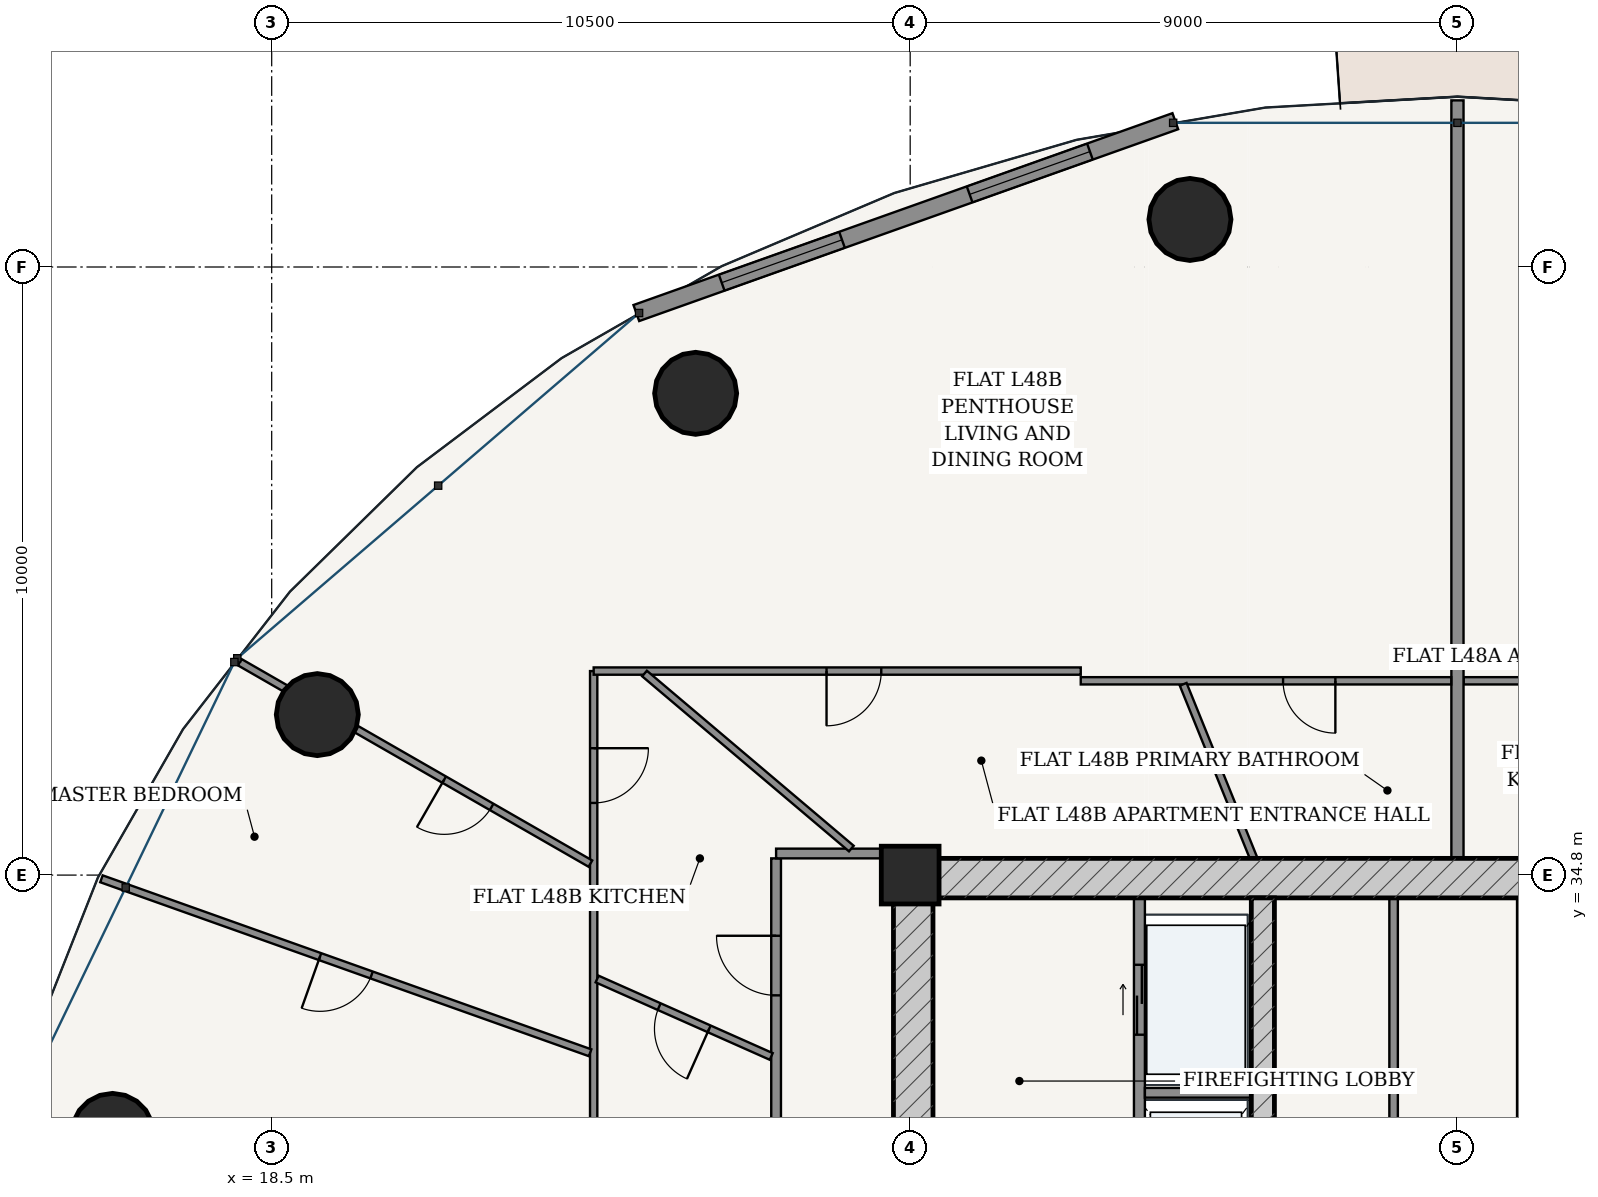
"""IFC4 building model, lengths in metres.
Left out: names, types, materials, properties, quantities, classifications, styles, units other than length and angle.
Written with IfcOpenShell. Run it as: python <this file> out.ifc"""

import sys

from ifc_helpers import new_model, si_unit, direction, frame, frame_2d, origin, origin_2d, place, context, subcontext, project, spatial, rectangle, hollow_circle, extrude, source, transform, mapped, element, fill, save


model = new_model("IFC4")
c1 = context("Model", 3, precision=1e-05, world=origin(), true_north=direction((-0.2419218956, 0.970295726276)))
c2 = subcontext(c1, "Body", "Model", "MODEL_VIEW")
j1 = project(units=[si_unit("LENGTHUNIT", "METRE"), si_unit("PLANEANGLEUNIT", "RADIAN")], contexts=[c1])
p1 = place(None, origin())
s1 = spatial("IfcSite", under=j1, at=p1, CompositionType="ELEMENT")
p2 = place(p1, origin())
s2 = spatial("IfcBuilding", under=s1, at=p2, CompositionType="ELEMENT")
p3 = place(p2, frame((0.0, 0.0, 182.2)))
s3 = spatial("IfcBuildingStorey", under=s2, at=p3, CompositionType="ELEMENT", Elevation=182.2)
p4 = place(p3, frame((29.0, 34.8, 0.0), z_axis=(0.0, 0.0, 1.0), x_axis=(1.0, 0.0, 0.0)))
e1 = element("IfcColumn", 1, at=p4, inside=s3, PredefinedType="COLUMN", context=c2, shape_type="SweptSolid", body=[
    extrude(rectangle(XDim=0.95, YDim=0.95, at=origin_2d()), origin(), (0.0, 0.0, 1.0), 3.6),
])
p5 = place(p3, frame((28.725, 34.75, 0.0), z_axis=(0.0, 0.0, 1.0), x_axis=(1.0, 0.0, 0.0)))
e2 = element("IfcWall", 2, at=p5, inside=s3, PredefinedType="SHEAR", context=c2, shape_type="SweptSolid", body=[
    extrude(rectangle(XDim=18.55, YDim=0.65, at=frame_2d((9.275, 0.0))), origin(), (0.0, 0.0, 1.0), 3.15),
])
p6 = place(p3, frame((29.05, 19.175, 0.0), z_axis=(0.0, 0.0, 1.0), x_axis=(0.0, 1.0, 0.0)))
e3 = element("IfcWall", 3, at=p6, inside=s3, PredefinedType="SHEAR", context=c2, shape_type="SweptSolid", body=[
    extrude(rectangle(XDim=15.25, YDim=0.65, at=frame_2d((7.625, 0.0))), origin(), (0.0, 0.0, 1.0), 3.15),
])
p7 = place(p6, frame((9.875, 0.0, 0.0)))
e4 = element("IfcOpeningElement", 4, at=p7, cuts=e3, PredefinedType="OPENING", context=c2, shape_type="SweptSolid", body=[
    extrude(rectangle(XDim=1.5, YDim=2.2, at=frame_2d((0.75, 1.1))), frame((0.0, 0.335, 0.0), z_axis=(0.0, -1.0, 0.0), x_axis=(1.0, 0.0, 0.0)), (0.0, 0.0, 1.0), 0.67),
])
p8 = place(p3, frame((34.8, 19.175, 0.0), z_axis=(0.0, 0.0, 1.0), x_axis=(0.0, 1.0, 0.0)))
e5 = element("IfcWall", 5, at=p8, inside=s3, PredefinedType="SHEAR", context=c2, shape_type="SweptSolid", body=[
    extrude(rectangle(XDim=15.25, YDim=0.38, at=frame_2d((7.625, 0.0))), origin(), (0.0, 0.0, 1.0), 3.15),
])
p9 = place(p8, frame((7.8, 0.0, 0.0)))
e6 = element("IfcOpeningElement", 6, at=p9, cuts=e5, PredefinedType="OPENING", context=c2, shape_type="SweptSolid", body=[
    extrude(rectangle(XDim=1.05, YDim=2.15, at=frame_2d((0.525, 1.075))), frame((0.0, 0.2, 0.0), z_axis=(0.0, -1.0, 0.0), x_axis=(1.0, 0.0, 0.0)), (0.0, 0.0, 1.0), 0.4),
])
for number, where, z_axis, x_axis in (
    (7, (33.601, 45.582, 0.0), (0.0, 0.0, 1.0), (1.0, 0.0, 0.0)),
    (8, (25.472, 42.723, 0.0), (0.0, 0.0, 1.0), (1.0, 0.0, 0.0)),
    (9, (19.25, 37.439, 0.0), (0.0, 0.0, 1.0), (1.0, 0.0, 0.0)),
    (10, (15.883, 30.536, 0.0), (0.0, 0.0, 1.0), (1.0, 0.0, 0.0)),
):
    element("IfcColumn", number, at=place(p3, frame(where, z_axis=z_axis, x_axis=x_axis)), inside=s3, PredefinedType="COLUMN", context=c2, shape_type="SweptSolid", body=[
        extrude(hollow_circle(Radius=0.675, WallThickness=0.042, at=origin_2d()), origin(), (0.0, 0.0, 1.0), 3.6),
    ])
p10 = place(p3, frame((33.36, 47.198, 0.0), z_axis=(0.0, 0.0, 1.0), x_axis=(-0.942095406405, -0.335344964522, 0.0)))
e11 = element("IfcWall", 11, at=p10, inside=s3, PredefinedType="SOLIDWALL", context=c2, shape_type="SweptSolid", body=[
    extrude(rectangle(XDim=9.408, YDim=0.28, at=frame_2d((4.704, 0.0))), origin(), (0.0, 0.0, 1.0), 3.15),
])
p11 = place(p10, frame((1.49, 0.0, 0.85)))
e12 = element("IfcOpeningElement", 12, at=p11, cuts=e11, PredefinedType="OPENING", context=c2, shape_type="SweptSolid", body=[
    extrude(rectangle(XDim=2.1, YDim=1.95, at=frame_2d((1.05, 0.975))), frame((0.0, 0.15, 0.0), z_axis=(0.0, -1.0, 0.0), x_axis=(1.0, 0.0, 0.0)), (0.0, 0.0, 1.0), 0.3),
])
p12 = place(p10, frame((5.818, 0.0, 0.85)))
e13 = element("IfcOpeningElement", 13, at=p12, cuts=e11, PredefinedType="OPENING", context=c2, shape_type="SweptSolid", body=[
    extrude(rectangle(XDim=2.1, YDim=1.95, at=frame_2d((1.05, 0.975))), frame((0.0, 0.15, 0.0), z_axis=(0.0, -1.0, 0.0), x_axis=(1.0, 0.0, 0.0)), (0.0, 0.0, 1.0), 0.3),
])
p13 = place(p3, frame((32.77, 28.52, 0.0), z_axis=(0.0, 0.0, 1.0), x_axis=(0.0, 1.0, 0.0)))
e14 = element("IfcWall", 14, at=p13, inside=s3, PredefinedType="PARTITIONING", context=c2, shape_type="SweptSolid", body=[
    extrude(rectangle(XDim=5.905, YDim=0.18, at=frame_2d((2.953, 0.0))), origin(), (0.0, 0.0, 1.0), 3.15),
])
p14 = place(p13, frame((3.655, 0.0, 0.0)))
e15 = element("IfcOpeningElement", 15, at=p14, cuts=e14, PredefinedType="OPENING", context=c2, shape_type="SweptSolid", body=[
    extrude(rectangle(XDim=1.15, YDim=2.2, at=frame_2d((0.575, 1.1))), frame((0.0, 0.1, 0.0), z_axis=(0.0, -1.0, 0.0), x_axis=(1.0, 0.0, 0.0)), (0.0, 0.0, 1.0), 0.2),
])
p15 = place(p13, frame((0.73, 0.0, 0.0)))
e16 = element("IfcOpeningElement", 16, at=p15, cuts=e14, PredefinedType="OPENING", context=c2, shape_type="SweptSolid", body=[
    extrude(rectangle(XDim=1.2, YDim=2.25, at=frame_2d((0.6, 1.125))), frame((0.0, 0.1, 0.0), z_axis=(0.0, -1.0, 0.0), x_axis=(1.0, 0.0, 0.0)), (0.0, 0.0, 1.0), 0.2),
])
p16 = place(p3, frame((32.86, 31.22, 0.0), z_axis=(0.0, 0.0, 1.0), x_axis=(1.0, 0.0, 0.0)))
e17 = element("IfcWall", 17, at=p16, inside=s3, PredefinedType="PARTITIONING", context=c2, shape_type="SweptSolid", body=[
    extrude(rectangle(XDim=1.75, YDim=0.16, at=frame_2d((0.875, 0.0))), origin(), (0.0, 0.0, 1.0), 3.15),
])
for number, where, z_axis, x_axis in (
    (18, (36.95, 28.56, 0.0), (0.0, 0.0, 1.0), (0.0, 1.0, 0.0)),
    (19, (39.05, 28.56, 0.0), (0.0, 0.0, 1.0), (0.0, 1.0, 0.0)),
):
    element("IfcWall", number, at=place(p3, frame(where, z_axis=z_axis, x_axis=x_axis)), inside=s3, PredefinedType="PARTITIONING", context=c2, shape_type="SweptSolid", body=[
        extrude(rectangle(XDim=5.865, YDim=0.14, at=frame_2d((2.933, 0.0))), origin(), (0.0, 0.0, 1.0), 3.15),
    ])
p17 = place(p3, frame((26.795, 24.4, 0.0), z_axis=(0.0, 0.0, 1.0), x_axis=(0.0, 1.0, 0.0)))
e20 = element("IfcWall", 20, at=p17, inside=s3, PredefinedType="PARTITIONING", context=c2, shape_type="SweptSolid", body=[
    extrude(rectangle(XDim=10.675, YDim=0.16, at=frame_2d((5.337, 0.0))), origin(), (0.0, 0.0, 1.0), 2.666),
])
p18 = place(p17, frame((8.422, 0.0, 0.0)))
e21 = element("IfcOpeningElement", 21, at=p18, cuts=e20, PredefinedType="OPENING", context=c2, shape_type="SweptSolid", body=[
    extrude(rectangle(XDim=0.98, YDim=2.2, at=frame_2d((0.49, 1.1))), frame((0.0, 0.09, 0.0), z_axis=(0.0, -1.0, 0.0), x_axis=(1.0, 0.0, 0.0)), (0.0, 0.0, 1.0), 0.18),
])
p19 = place(p3, frame((26.795, 35.155, 0.0), z_axis=(0.0, 0.0, 1.0), x_axis=(1.0, 0.0, 0.0)))
e22 = element("IfcWall", 22, at=p19, inside=s3, PredefinedType="PARTITIONING", context=c2, shape_type="SweptSolid", body=[
    extrude(rectangle(XDim=1.93, YDim=0.16, at=frame_2d((0.965, 0.0))), origin(), (0.0, 0.0, 1.0), 3.15),
])
p20 = place(p3, frame((38.102, 37.995, 0.0), z_axis=(0.0, 0.0, 1.0), x_axis=(1.0, 0.0, 0.0)))
e23 = element("IfcWall", 23, at=p20, inside=s3, PredefinedType="PARTITIONING", context=c2, shape_type="SweptSolid", body=[
    extrude(rectangle(XDim=6.093, YDim=0.12, at=frame_2d((3.046, 0.0))), origin(), (0.0, 0.0, 1.0), 2.666),
])
p21 = place(p3, frame((38.0, 35.075, 0.0), z_axis=(0.0, 0.0, 1.0), x_axis=(0.0, 1.0, 0.0)))
e24 = element("IfcWall", 24, at=p21, inside=s3, PredefinedType="PARTITIONING", context=c2, shape_type="SweptSolid", body=[
    extrude(rectangle(XDim=12.465, YDim=0.2, at=frame_2d((6.232, 0.0))), origin(), (0.0, 0.0, 1.0), 2.34),
])
p22 = place(p3, frame((23.795, 26.902, 0.0), z_axis=(0.0, 0.0, 1.0), x_axis=(0.0, 1.0, 0.0)))
e25 = element("IfcWall", 25, at=p22, inside=s3, PredefinedType="PARTITIONING", context=c2, shape_type="SweptSolid", body=[
    extrude(rectangle(XDim=11.253, YDim=0.12, at=frame_2d((5.626, 0.0))), origin(), (0.0, 0.0, 1.0), 2.666),
])
p23 = place(p22, frame((9.085, 0.0, 0.0)))
e26 = element("IfcOpeningElement", 26, at=p23, cuts=e25, PredefinedType="OPENING", context=c2, shape_type="SweptSolid", body=[
    extrude(rectangle(XDim=0.9, YDim=2.15, at=frame_2d((0.45, 1.075))), frame((0.0, 0.07, 0.0), z_axis=(0.0, -1.0, 0.0), x_axis=(1.0, 0.0, 0.0)), (0.0, 0.0, 1.0), 0.14),
])
p24 = place(p3, frame((23.795, 38.155, 0.0), z_axis=(0.0, 0.0, 1.0), x_axis=(1.0, 0.0, 0.0)))
e27 = element("IfcWall", 27, at=p24, inside=s3, PredefinedType="PARTITIONING", context=c2, shape_type="SweptSolid", body=[
    extrude(rectangle(XDim=8.01, YDim=0.12, at=frame_2d((4.005, 0.0))), origin(), (0.0, 0.0, 1.0), 2.666),
])
p25 = place(p24, frame((3.83, 0.0, 0.0)))
e28 = element("IfcOpeningElement", 28, at=p25, cuts=e27, PredefinedType="OPENING", context=c2, shape_type="SweptSolid", body=[
    extrude(rectangle(XDim=0.9, YDim=2.15, at=frame_2d((0.45, 1.075))), frame((0.0, 0.07, 0.0), z_axis=(0.0, -1.0, 0.0), x_axis=(1.0, 0.0, 0.0)), (0.0, 0.0, 1.0), 0.14),
])
p26 = place(p3, frame((31.805, 37.995, 0.0), z_axis=(0.0, 0.0, 1.0), x_axis=(1.0, 0.0, 0.0)))
e29 = element("IfcWall", 29, at=p26, inside=s3, PredefinedType="PARTITIONING", context=c2, shape_type="SweptSolid", body=[
    extrude(rectangle(XDim=6.093, YDim=0.12, at=frame_2d((3.046, 0.0))), origin(), (0.0, 0.0, 1.0), 2.666),
])
p27 = place(p26, frame((3.327, 0.0, 0.0)))
e30 = element("IfcOpeningElement", 30, at=p27, cuts=e29, PredefinedType="OPENING", context=c2, shape_type="SweptSolid", body=[
    extrude(rectangle(XDim=0.86, YDim=2.15, at=frame_2d((0.43, 1.075))), frame((0.0, 0.07, 0.0), z_axis=(0.0, -1.0, 0.0), x_axis=(1.0, 0.0, 0.0)), (0.0, 0.0, 1.0), 0.14),
])
p28 = place(p3, frame((23.741, 34.989, 0.0), z_axis=(0.0, 0.0, 1.0), x_axis=(-0.867167953258, 0.498015803808, 0.0)))
e31 = element("IfcWall", 31, at=p28, inside=s3, PredefinedType="PARTITIONING", context=c2, shape_type="SweptSolid", body=[
    extrude(rectangle(XDim=6.65, YDim=0.12, at=frame_2d((3.325, 0.0))), origin(), (0.0, 0.0, 1.0), 2.5),
])
p29 = place(p28, frame((1.873, 0.0, 0.0)))
e32 = element("IfcOpeningElement", 32, at=p29, cuts=e31, PredefinedType="OPENING", context=c2, shape_type="SweptSolid", body=[
    extrude(rectangle(XDim=0.9, YDim=2.15, at=frame_2d((0.45, 1.075))), frame((0.0, 0.07, 0.0), z_axis=(0.0, -1.0, 0.0), x_axis=(1.0, 0.0, 0.0)), (0.0, 0.0, 1.0), 0.14),
])
p30 = place(p3, frame((23.737, 31.878, 0.0), z_axis=(0.0, 0.0, 1.0), x_axis=(-0.942071057968, 0.335413359512, 0.0)))
e33 = element("IfcWall", 33, at=p30, inside=s3, PredefinedType="PARTITIONING", context=c2, shape_type="SweptSolid", body=[
    extrude(rectangle(XDim=8.53, YDim=0.12, at=frame_2d((4.265, 0.0))), origin(), (0.0, 0.0, 1.0), 2.666),
])
p31 = place(p30, frame((3.815, 0.0, 0.0)))
e34 = element("IfcOpeningElement", 34, at=p31, cuts=e33, PredefinedType="OPENING", context=c2, shape_type="SweptSolid", body=[
    extrude(rectangle(XDim=0.9, YDim=2.15, at=frame_2d((0.45, 1.075))), frame((0.0, 0.07, 0.0), z_axis=(0.0, -1.0, 0.0), x_axis=(1.0, 0.0, 0.0)), (0.0, 0.0, 1.0), 0.14),
])
p32 = place(p3, frame((34.649, 35.075, 0.0), z_axis=(0.0, 0.0, 1.0), x_axis=(-0.375339921816, 0.926887233212, 0.0)))
e35 = element("IfcWall", 35, at=p32, inside=s3, PredefinedType="PARTITIONING", context=c2, shape_type="SweptSolid", body=[
    extrude(rectangle(XDim=3.088, YDim=0.12, at=frame_2d((1.544, 0.0))), origin(), (0.0, 0.0, 1.0), 3.15),
])
p33 = place(p3, frame((28.032, 35.236, 0.0), z_axis=(0.0, 0.0, 1.0), x_axis=(-0.763321857138, 0.646018376221, 0.0)))
e36 = element("IfcWall", 36, at=p33, inside=s3, PredefinedType="PARTITIONING", context=c2, shape_type="SweptSolid", body=[
    extrude(rectangle(XDim=4.456, YDim=0.12, at=frame_2d((2.228, 0.0))), origin(), (0.0, 0.0, 1.0), 2.825),
])
p34 = place(p3, frame((26.715, 31.818, 0.0), z_axis=(0.0, 0.0, 1.0), x_axis=(-0.913750499147, 0.406275799561, 0.0)))
e37 = element("IfcWall", 37, at=p34, inside=s3, PredefinedType="PARTITIONING", context=c2, shape_type="SweptSolid", body=[
    extrude(rectangle(XDim=3.134, YDim=0.12, at=frame_2d((1.567, 0.0))), origin(), (0.0, 0.0, 1.0), 2.825),
])
p35 = place(p34, frame((1.117, 0.0, 0.0)))
e38 = element("IfcOpeningElement", 38, at=p35, cuts=e37, PredefinedType="OPENING", context=c2, shape_type="SweptSolid", body=[
    extrude(rectangle(XDim=0.9, YDim=2.15, at=frame_2d((0.45, 1.075))), frame((0.0, 0.07, 0.0), z_axis=(0.0, -1.0, 0.0), x_axis=(1.0, 0.0, 0.0)), (0.0, 0.0, 1.0), 0.14),
])
m1 = source(origin(), c2, "Body", "SweptSolid", [
    extrude(rectangle(XDim=2.1, YDim=1.95, at=frame_2d((1.05, 0.975))), frame((0.0, 0.03, 0.0), z_axis=(0.0, -1.0, 0.0), x_axis=(1.0, 0.0, 0.0)), (0.0, 0.0, 1.0), 0.06),
])
p36 = place(p11, origin())
e39 = element("IfcWindow", 39, at=p36, inside=s3, PartitioningType="SINGLE_PANEL", PredefinedType="WINDOW", context=c2, shape_type="MappedRepresentation", body=[
    mapped(m1, transform((0.0, 0.0, 0.0), scale=1.0)),
])
fill(e12, e39)
p37 = place(p12, origin())
e40 = element("IfcWindow", 40, at=p37, inside=s3, PartitioningType="SINGLE_PANEL", PredefinedType="WINDOW", context=c2, shape_type="MappedRepresentation", body=[
    mapped(m1, transform((0.0, 0.0, 0.0), scale=1.0)),
])
fill(e13, e40)
m2 = source(origin(), c2, "Body", "SweptSolid", [
    extrude(rectangle(XDim=1.15, YDim=2.2, at=frame_2d((0.575, 1.1))), frame((0.0, 0.025, 0.0), z_axis=(0.0, -1.0, 0.0), x_axis=(1.0, 0.0, 0.0)), (0.0, 0.0, 1.0), 0.05),
])
p38 = place(p14, origin())
e41 = element("IfcDoor", 41, at=p38, inside=s3, OperationType="DOUBLE_DOOR_SLIDING", PredefinedType="DOOR", context=c2, shape_type="MappedRepresentation", body=[
    mapped(m2, transform((0.0, 0.0, 0.0), scale=1.0)),
])
fill(e15, e41)
m3 = source(origin(), c2, "Body", "SweptSolid", [
    extrude(rectangle(XDim=0.98, YDim=2.2, at=frame_2d((0.49, 1.1))), frame((0.0, 0.025, 0.0), z_axis=(0.0, -1.0, 0.0), x_axis=(1.0, 0.0, 0.0)), (0.0, 0.0, 1.0), 0.05),
])
p39 = place(p18, origin())
e42 = element("IfcDoor", 42, at=p39, inside=s3, OperationType="SINGLE_SWING_RIGHT", PredefinedType="DOOR", context=c2, shape_type="MappedRepresentation", body=[
    mapped(m3, transform((0.0, 0.0, 0.0), scale=1.0)),
])
fill(e21, e42)
m4 = source(origin(), c2, "Body", "SweptSolid", [
    extrude(rectangle(XDim=0.9, YDim=2.15, at=frame_2d((0.45, 1.075))), frame((0.0, 0.025, 0.0), z_axis=(0.0, -1.0, 0.0), x_axis=(1.0, 0.0, 0.0)), (0.0, 0.0, 1.0), 0.05),
])
p40 = place(p23, frame((0.9, 0.0, 0.0), z_axis=(0.0, 0.0, 1.0), x_axis=(-1.0, 0.0, 0.0)))
e43 = element("IfcDoor", 43, at=p40, inside=s3, OperationType="SINGLE_SWING_LEFT", PredefinedType="DOOR", context=c2, shape_type="MappedRepresentation", body=[
    mapped(m4, transform((0.0, 0.0, 0.0), scale=1.0)),
])
fill(e26, e43)
p41 = place(p25, frame((0.9, 0.0, 0.0), z_axis=(0.0, 0.0, 1.0), x_axis=(-1.0, 0.0, 0.0)))
e44 = element("IfcDoor", 44, at=p41, inside=s3, OperationType="SINGLE_SWING_RIGHT", PredefinedType="DOOR", context=c2, shape_type="MappedRepresentation", body=[
    mapped(m4, transform((0.0, 0.0, 0.0), scale=1.0)),
])
fill(e28, e44)
p42 = place(p35, origin())
e45 = element("IfcDoor", 45, at=p42, inside=s3, OperationType="SINGLE_SWING_LEFT", PredefinedType="DOOR", context=c2, shape_type="MappedRepresentation", body=[
    mapped(m4, transform((0.0, 0.0, 0.0), scale=1.0)),
])
fill(e38, e45)
p43 = place(p29, origin())
e46 = element("IfcDoor", 46, at=p43, inside=s3, OperationType="SINGLE_SWING_RIGHT", PredefinedType="DOOR", context=c2, shape_type="MappedRepresentation", body=[
    mapped(m4, transform((0.0, 0.0, 0.0), scale=1.0)),
])
fill(e32, e46)
m5 = source(origin(), c2, "Body", "SweptSolid", [
    extrude(rectangle(XDim=0.86, YDim=2.15, at=frame_2d((0.43, 1.075))), frame((0.0, 0.025, 0.0), z_axis=(0.0, -1.0, 0.0), x_axis=(1.0, 0.0, 0.0)), (0.0, 0.0, 1.0), 0.05),
])
p44 = place(p27, frame((0.86, 0.0, 0.0), z_axis=(0.0, 0.0, 1.0), x_axis=(-1.0, 0.0, 0.0)))
e47 = element("IfcDoor", 47, at=p44, inside=s3, OperationType="SINGLE_SWING_LEFT", PredefinedType="DOOR", context=c2, shape_type="MappedRepresentation", body=[
    mapped(m5, transform((0.0, 0.0, 0.0), scale=1.0)),
])
fill(e30, e47)
p45 = place(p31, origin())
e48 = element("IfcDoor", 48, at=p45, inside=s3, OperationType="SINGLE_SWING_RIGHT", PredefinedType="DOOR", context=c2, shape_type="MappedRepresentation", body=[
    mapped(m4, transform((0.0, 0.0, 0.0), scale=1.0)),
])
fill(e34, e48)
save(model, sys.argv[1])
